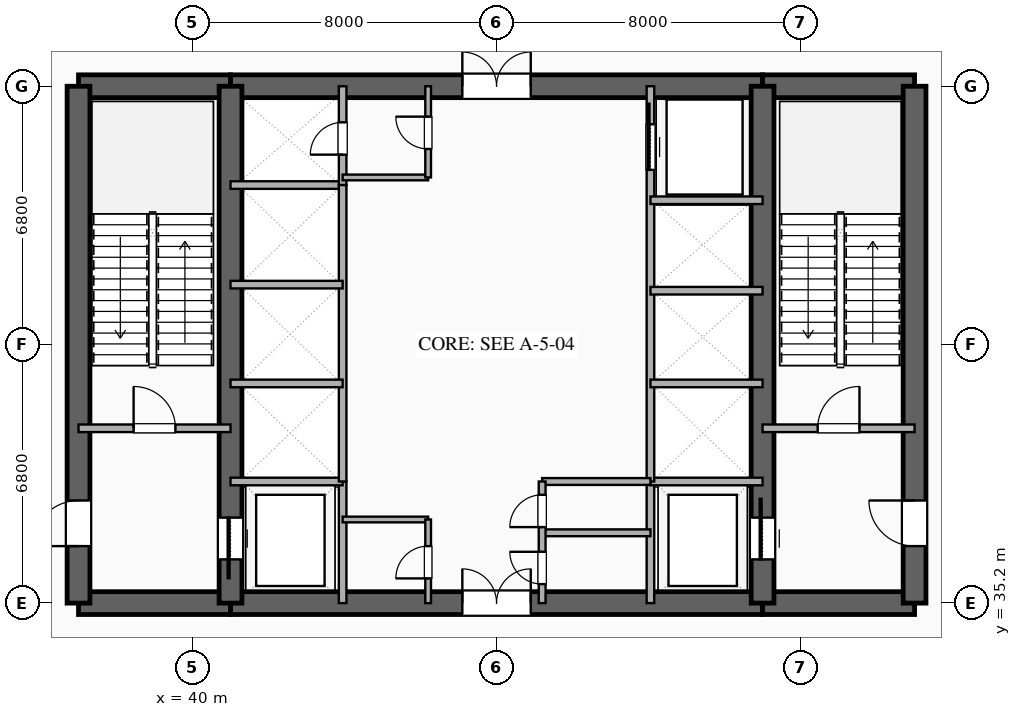
"""IFC4 building model, lengths in metres.
Left out: names, types, materials, properties, quantities, classifications, styles, units other than length and angle.
Written with IfcOpenShell. Run it as: python <this file> out.ifc"""

import sys

from ifc_helpers import new_model, si_unit, direction, frame, frame_2d, origin, place, context, subcontext, project, spatial, rectangle, extrude, element, fill, save


model = new_model("IFC4")
c1 = context("Model", 3, precision=1e-05, world=origin(), true_north=direction((0.0, 1.0)))
c2 = subcontext(c1, "Body", "Model", "MODEL_VIEW")
j1 = project(units=[si_unit("LENGTHUNIT", "METRE"), si_unit("PLANEANGLEUNIT", "RADIAN")], contexts=[c1])
p1 = place(None, origin())
s1 = spatial("IfcSite", under=j1, at=p1, CompositionType="ELEMENT")
p2 = place(p1, origin())
s2 = spatial("IfcBuilding", under=s1, at=p2, CompositionType="ELEMENT")
p3 = place(p2, frame((0.0, 0.0, 6.0)))
s3 = spatial("IfcBuildingStorey", under=s2, at=p3, CompositionType="ELEMENT", Elevation=6.0)
p4 = place(p3, frame((37.0, 35.2, 0.0), z_axis=(0.0, 0.0, 1.0), x_axis=(1.0, 0.0, 0.0)))
e1 = element("IfcWall", 1, at=p4, inside=s3, PredefinedType="SHEAR", context=c2, shape_type="SweptSolid", body=[
    extrude(rectangle(XDim=4.0, YDim=0.6, at=frame_2d((2.0, 0.0))), origin(), (0.0, 0.0, 1.0), 5.12),
])
p5 = place(p3, frame((41.0, 35.2, 0.0), z_axis=(0.0, 0.0, 1.0), x_axis=(1.0, 0.0, 0.0)))
e2 = element("IfcWall", 2, at=p5, inside=s3, PredefinedType="SHEAR", context=c2, shape_type="SweptSolid", body=[
    extrude(rectangle(XDim=14.0, YDim=0.6, at=frame_2d((7.0, 0.0))), origin(), (0.0, 0.0, 1.0), 5.12),
])
p6 = place(p5, frame((6.1, 0.0, 0.0)))
e3 = element("IfcOpeningElement", 3, at=p6, cuts=e2, PredefinedType="OPENING", context=c2, shape_type="SweptSolid", body=[
    extrude(rectangle(XDim=1.8, YDim=2.25, at=frame_2d((0.9, 1.125))), frame((0.0, 0.31, 0.0), z_axis=(0.0, -1.0, 0.0), x_axis=(1.0, 0.0, 0.0)), (0.0, 0.0, 1.0), 0.62),
])
for number, where, z_axis, x_axis in (
    (4, (55.0, 35.2, 0.0), (0.0, 0.0, 1.0), (1.0, 0.0, 0.0)),
    (5, (37.0, 48.8, 0.0), (0.0, 0.0, 1.0), (1.0, 0.0, 0.0)),
):
    element("IfcWall", number, at=place(p3, frame(where, z_axis=z_axis, x_axis=x_axis)), inside=s3, PredefinedType="SHEAR", context=c2, shape_type="SweptSolid", body=[
        extrude(rectangle(XDim=4.0, YDim=0.6, at=frame_2d((2.0, 0.0))), origin(), (0.0, 0.0, 1.0), 5.12),
    ])
p7 = place(p3, frame((41.0, 48.8, 0.0), z_axis=(0.0, 0.0, 1.0), x_axis=(1.0, 0.0, 0.0)))
e6 = element("IfcWall", 6, at=p7, inside=s3, PredefinedType="SHEAR", context=c2, shape_type="SweptSolid", body=[
    extrude(rectangle(XDim=14.0, YDim=0.6, at=frame_2d((7.0, 0.0))), origin(), (0.0, 0.0, 1.0), 5.12),
])
p8 = place(p7, frame((6.1, 0.0, 0.0)))
e7 = element("IfcOpeningElement", 7, at=p8, cuts=e6, PredefinedType="OPENING", context=c2, shape_type="SweptSolid", body=[
    extrude(rectangle(XDim=1.8, YDim=2.25, at=frame_2d((0.9, 1.125))), frame((0.0, 0.31, 0.0), z_axis=(0.0, -1.0, 0.0), x_axis=(1.0, 0.0, 0.0)), (0.0, 0.0, 1.0), 0.62),
])
p9 = place(p3, frame((55.0, 48.8, 0.0), z_axis=(0.0, 0.0, 1.0), x_axis=(1.0, 0.0, 0.0)))
e8 = element("IfcWall", 8, at=p9, inside=s3, PredefinedType="SHEAR", context=c2, shape_type="SweptSolid", body=[
    extrude(rectangle(XDim=4.0, YDim=0.6, at=frame_2d((2.0, 0.0))), origin(), (0.0, 0.0, 1.0), 5.12),
])
p10 = place(p3, frame((37.0, 35.2, 0.0), z_axis=(0.0, 0.0, 1.0), x_axis=(0.0, 1.0, 0.0)))
e9 = element("IfcWall", 9, at=p10, inside=s3, PredefinedType="SHEAR", context=c2, shape_type="SweptSolid", body=[
    extrude(rectangle(XDim=13.6, YDim=0.6, at=frame_2d((6.8, 0.0))), origin(), (0.0, 0.0, 1.0), 5.12),
])
p11 = place(p10, frame((1.5, 0.0, 0.0)))
e10 = element("IfcOpeningElement", 10, at=p11, cuts=e9, PredefinedType="OPENING", context=c2, shape_type="SweptSolid", body=[
    extrude(rectangle(XDim=1.2, YDim=2.15, at=frame_2d((0.6, 1.075))), frame((0.0, 0.31, 0.0), z_axis=(0.0, -1.0, 0.0), x_axis=(1.0, 0.0, 0.0)), (0.0, 0.0, 1.0), 0.62),
])
p12 = place(p3, frame((59.0, 35.2, 0.0), z_axis=(0.0, 0.0, 1.0), x_axis=(0.0, 1.0, 0.0)))
e11 = element("IfcWall", 11, at=p12, inside=s3, PredefinedType="SHEAR", context=c2, shape_type="SweptSolid", body=[
    extrude(rectangle(XDim=13.6, YDim=0.6, at=frame_2d((6.8, 0.0))), origin(), (0.0, 0.0, 1.0), 5.12),
])
p13 = place(p12, frame((1.5, 0.0, 0.0)))
e12 = element("IfcOpeningElement", 12, at=p13, cuts=e11, PredefinedType="OPENING", context=c2, shape_type="SweptSolid", body=[
    extrude(rectangle(XDim=1.2, YDim=2.15, at=frame_2d((0.6, 1.075))), frame((0.0, 0.31, 0.0), z_axis=(0.0, -1.0, 0.0), x_axis=(1.0, 0.0, 0.0)), (0.0, 0.0, 1.0), 0.62),
])
p14 = place(p3, frame((41.0, 35.2, 0.0), z_axis=(0.0, 0.0, 1.0), x_axis=(0.0, 1.0, 0.0)))
e13 = element("IfcWall", 13, at=p14, inside=s3, PredefinedType="SHEAR", context=c2, shape_type="SweptSolid", body=[
    extrude(rectangle(XDim=13.6, YDim=0.6, at=frame_2d((6.8, 0.0))), origin(), (0.0, 0.0, 1.0), 5.12),
])
p15 = place(p14, frame((1.15, 0.0, 0.0)))
e14 = element("IfcOpeningElement", 14, at=p15, cuts=e13, PredefinedType="OPENING", context=c2, shape_type="SweptSolid", body=[
    extrude(rectangle(XDim=1.1, YDim=2.2, at=frame_2d((0.55, 1.1))), frame((0.0, 0.31, 0.0), z_axis=(0.0, -1.0, 0.0), x_axis=(1.0, 0.0, 0.0)), (0.0, 0.0, 1.0), 0.62),
])
p16 = place(p3, frame((55.0, 35.2, 0.0), z_axis=(0.0, 0.0, 1.0), x_axis=(0.0, 1.0, 0.0)))
e15 = element("IfcWall", 15, at=p16, inside=s3, PredefinedType="SHEAR", context=c2, shape_type="SweptSolid", body=[
    extrude(rectangle(XDim=13.6, YDim=0.6, at=frame_2d((6.8, 0.0))), origin(), (0.0, 0.0, 1.0), 5.12),
])
p17 = place(p16, frame((1.15, 0.0, 0.0)))
e16 = element("IfcOpeningElement", 16, at=p17, cuts=e15, PredefinedType="OPENING", context=c2, shape_type="SweptSolid", body=[
    extrude(rectangle(XDim=1.1, YDim=2.2, at=frame_2d((0.55, 1.1))), frame((0.0, 0.31, 0.0), z_axis=(0.0, -1.0, 0.0), x_axis=(1.0, 0.0, 0.0)), (0.0, 0.0, 1.0), 0.62),
])
p18 = place(p3, frame((37.0, 39.8, 0.0), z_axis=(0.0, 0.0, 1.0), x_axis=(1.0, 0.0, 0.0)))
e17 = element("IfcWall", 17, at=p18, inside=s3, PredefinedType="SOLIDWALL", context=c2, shape_type="SweptSolid", body=[
    extrude(rectangle(XDim=4.0, YDim=0.2, at=frame_2d((2.0, 0.0))), origin(), (0.0, 0.0, 1.0), 4.32),
])
p19 = place(p18, frame((1.45, 0.0, 0.0)))
e18 = element("IfcOpeningElement", 18, at=p19, cuts=e17, PredefinedType="OPENING", context=c2, shape_type="SweptSolid", body=[
    extrude(rectangle(XDim=1.1, YDim=2.15, at=frame_2d((0.55, 1.075))), frame((0.0, 0.11, 0.0), z_axis=(0.0, -1.0, 0.0), x_axis=(1.0, 0.0, 0.0)), (0.0, 0.0, 1.0), 0.22),
])
p20 = place(p3, frame((55.0, 39.8, 0.0), z_axis=(0.0, 0.0, 1.0), x_axis=(1.0, 0.0, 0.0)))
e19 = element("IfcWall", 19, at=p20, inside=s3, PredefinedType="SOLIDWALL", context=c2, shape_type="SweptSolid", body=[
    extrude(rectangle(XDim=4.0, YDim=0.2, at=frame_2d((2.0, 0.0))), origin(), (0.0, 0.0, 1.0), 4.32),
])
p21 = place(p20, frame((1.45, 0.0, 0.0)))
e20 = element("IfcOpeningElement", 20, at=p21, cuts=e19, PredefinedType="OPENING", context=c2, shape_type="SweptSolid", body=[
    extrude(rectangle(XDim=1.1, YDim=2.15, at=frame_2d((0.55, 1.075))), frame((0.0, 0.11, 0.0), z_axis=(0.0, -1.0, 0.0), x_axis=(1.0, 0.0, 0.0)), (0.0, 0.0, 1.0), 0.22),
])
p22 = place(p3, frame((43.95, 35.2, 0.0), z_axis=(0.0, 0.0, 1.0), x_axis=(0.0, 1.0, 0.0)))
e21 = element("IfcWall", 21, at=p22, inside=s3, PredefinedType="SOLIDWALL", context=c2, shape_type="SweptSolid", body=[
    extrude(rectangle(XDim=3.2, YDim=0.2, at=frame_2d((1.6, 0.0))), origin(), (0.0, 0.0, 1.0), 4.32),
])
p23 = place(p3, frame((41.0, 38.4, 0.0), z_axis=(0.0, 0.0, 1.0), x_axis=(1.0, 0.0, 0.0)))
e22 = element("IfcWall", 22, at=p23, inside=s3, PredefinedType="SOLIDWALL", context=c2, shape_type="SweptSolid", body=[
    extrude(rectangle(XDim=2.95, YDim=0.2, at=frame_2d((1.475, 0.0))), origin(), (0.0, 0.0, 1.0), 4.32),
])
p24 = place(p3, frame((52.05, 35.2, 0.0), z_axis=(0.0, 0.0, 1.0), x_axis=(0.0, 1.0, 0.0)))
e23 = element("IfcWall", 23, at=p24, inside=s3, PredefinedType="SOLIDWALL", context=c2, shape_type="SweptSolid", body=[
    extrude(rectangle(XDim=3.2, YDim=0.2, at=frame_2d((1.6, 0.0))), origin(), (0.0, 0.0, 1.0), 4.32),
])
for number, where, z_axis, x_axis in (
    (24, (52.05, 38.4, 0.0), (0.0, 0.0, 1.0), (1.0, 0.0, 0.0)),
    (25, (41.0, 46.2, 0.0), (0.0, 0.0, 1.0), (1.0, 0.0, 0.0)),
):
    element("IfcWall", number, at=place(p3, frame(where, z_axis=z_axis, x_axis=x_axis)), inside=s3, PredefinedType="SOLIDWALL", context=c2, shape_type="SweptSolid", body=[
        extrude(rectangle(XDim=2.95, YDim=0.2, at=frame_2d((1.475, 0.0))), origin(), (0.0, 0.0, 1.0), 4.32),
    ])
p25 = place(p3, frame((43.95, 46.2, 0.0), z_axis=(0.0, 0.0, 1.0), x_axis=(0.0, 1.0, 0.0)))
e26 = element("IfcWall", 26, at=p25, inside=s3, PredefinedType="SOLIDWALL", context=c2, shape_type="SweptSolid", body=[
    extrude(rectangle(XDim=2.6, YDim=0.2, at=frame_2d((1.3, 0.0))), origin(), (0.0, 0.0, 1.0), 4.32),
])
p26 = place(p25, frame((0.8, 0.0, 0.0)))
e27 = element("IfcOpeningElement", 27, at=p26, cuts=e26, PredefinedType="OPENING", context=c2, shape_type="SweptSolid", body=[
    extrude(rectangle(XDim=0.85, YDim=2.15, at=frame_2d((0.425, 1.075))), frame((0.0, 0.11, 0.0), z_axis=(0.0, -1.0, 0.0), x_axis=(1.0, 0.0, 0.0)), (0.0, 0.0, 1.0), 0.22),
])
p27 = place(p3, frame((43.95, 38.4, 0.0), z_axis=(0.0, 0.0, 1.0), x_axis=(0.0, 1.0, 0.0)))
e28 = element("IfcWall", 28, at=p27, inside=s3, PredefinedType="SOLIDWALL", context=c2, shape_type="SweptSolid", body=[
    extrude(rectangle(XDim=7.8, YDim=0.2, at=frame_2d((3.9, 0.0))), origin(), (0.0, 0.0, 1.0), 4.32),
])
for number, where, z_axis, x_axis in (
    (29, (41.0, 40.98, 0.0), (0.0, 0.0, 1.0), (1.0, 0.0, 0.0)),
    (30, (41.0, 43.58, 0.0), (0.0, 0.0, 1.0), (1.0, 0.0, 0.0)),
):
    element("IfcWall", number, at=place(p3, frame(where, z_axis=z_axis, x_axis=x_axis)), inside=s3, PredefinedType="SOLIDWALL", context=c2, shape_type="SweptSolid", body=[
        extrude(rectangle(XDim=2.95, YDim=0.2, at=frame_2d((1.475, 0.0))), origin(), (0.0, 0.0, 1.0), 4.32),
    ])
p28 = place(p3, frame((52.05, 38.4, 0.0), z_axis=(0.0, 0.0, 1.0), x_axis=(0.0, 1.0, 0.0)))
e31 = element("IfcWall", 31, at=p28, inside=s3, PredefinedType="SOLIDWALL", context=c2, shape_type="SweptSolid", body=[
    extrude(rectangle(XDim=10.4, YDim=0.2, at=frame_2d((5.2, 0.0))), origin(), (0.0, 0.0, 1.0), 4.32),
])
p29 = place(p28, frame((8.2, 0.0, 0.0)))
e32 = element("IfcOpeningElement", 32, at=p29, cuts=e31, PredefinedType="OPENING", context=c2, shape_type="SweptSolid", body=[
    extrude(rectangle(XDim=1.2, YDim=2.2, at=frame_2d((0.6, 1.1))), frame((0.0, 0.11, 0.0), z_axis=(0.0, -1.0, 0.0), x_axis=(1.0, 0.0, 0.0)), (0.0, 0.0, 1.0), 0.22),
])
for number, where, z_axis, x_axis in (
    (33, (52.05, 40.98, 0.0), (0.0, 0.0, 1.0), (1.0, 0.0, 0.0)),
    (34, (52.05, 43.42, 0.0), (0.0, 0.0, 1.0), (1.0, 0.0, 0.0)),
    (35, (52.05, 45.8, 0.0), (0.0, 0.0, 1.0), (1.0, 0.0, 0.0)),
):
    element("IfcWall", number, at=place(p3, frame(where, z_axis=z_axis, x_axis=x_axis)), inside=s3, PredefinedType="SOLIDWALL", context=c2, shape_type="SweptSolid", body=[
        extrude(rectangle(XDim=2.95, YDim=0.2, at=frame_2d((1.475, 0.0))), origin(), (0.0, 0.0, 1.0), 4.32),
    ])
p30 = place(p3, frame((43.95, 37.4, 0.0), z_axis=(0.0, 0.0, 1.0), x_axis=(1.0, 0.0, 0.0)))
e36 = element("IfcWall", 36, at=p30, inside=s3, PredefinedType="PARTITIONING", context=c2, shape_type="SweptSolid", body=[
    extrude(rectangle(XDim=2.25, YDim=0.15, at=frame_2d((1.125, 0.0))), origin(), (0.0, 0.0, 1.0), 4.32),
])
p31 = place(p3, frame((46.2, 35.2, 0.0), z_axis=(0.0, 0.0, 1.0), x_axis=(0.0, 1.0, 0.0)))
e37 = element("IfcWall", 37, at=p31, inside=s3, PredefinedType="PARTITIONING", context=c2, shape_type="SweptSolid", body=[
    extrude(rectangle(XDim=2.2, YDim=0.15, at=frame_2d((1.1, 0.0))), origin(), (0.0, 0.0, 1.0), 4.32),
])
p32 = place(p31, frame((0.65, 0.0, 0.0)))
e38 = element("IfcOpeningElement", 38, at=p32, cuts=e37, PredefinedType="OPENING", context=c2, shape_type="SweptSolid", body=[
    extrude(rectangle(XDim=0.85, YDim=2.15, at=frame_2d((0.425, 1.075))), frame((0.0, 0.085, 0.0), z_axis=(0.0, -1.0, 0.0), x_axis=(1.0, 0.0, 0.0)), (0.0, 0.0, 1.0), 0.17),
])
p33 = place(p3, frame((43.95, 46.4, 0.0), z_axis=(0.0, 0.0, 1.0), x_axis=(1.0, 0.0, 0.0)))
e39 = element("IfcWall", 39, at=p33, inside=s3, PredefinedType="PARTITIONING", context=c2, shape_type="SweptSolid", body=[
    extrude(rectangle(XDim=2.25, YDim=0.15, at=frame_2d((1.125, 0.0))), origin(), (0.0, 0.0, 1.0), 4.32),
])
p34 = place(p3, frame((46.2, 46.4, 0.0), z_axis=(0.0, 0.0, 1.0), x_axis=(0.0, 1.0, 0.0)))
e40 = element("IfcWall", 40, at=p34, inside=s3, PredefinedType="PARTITIONING", context=c2, shape_type="SweptSolid", body=[
    extrude(rectangle(XDim=2.4, YDim=0.15, at=frame_2d((1.2, 0.0))), origin(), (0.0, 0.0, 1.0), 4.32),
])
p35 = place(p34, frame((0.75, 0.0, 0.0)))
e41 = element("IfcOpeningElement", 41, at=p35, cuts=e40, PredefinedType="OPENING", context=c2, shape_type="SweptSolid", body=[
    extrude(rectangle(XDim=0.85, YDim=2.15, at=frame_2d((0.425, 1.075))), frame((0.0, 0.085, 0.0), z_axis=(0.0, -1.0, 0.0), x_axis=(1.0, 0.0, 0.0)), (0.0, 0.0, 1.0), 0.17),
])
for number, where, z_axis, x_axis in (
    (42, (49.2, 37.05, 0.0), (0.0, 0.0, 1.0), (1.0, 0.0, 0.0)),
    (43, (49.2, 38.4, 0.0), (0.0, 0.0, 1.0), (1.0, 0.0, 0.0)),
):
    element("IfcWall", number, at=place(p3, frame(where, z_axis=z_axis, x_axis=x_axis)), inside=s3, PredefinedType="PLUMBINGWALL", context=c2, shape_type="SweptSolid", body=[
        extrude(rectangle(XDim=2.85, YDim=0.18, at=frame_2d((1.425, 0.0))), origin(), (0.0, 0.0, 1.0), 4.32),
    ])
p36 = place(p3, frame((49.2, 35.2, 0.0), z_axis=(0.0, 0.0, 1.0), x_axis=(0.0, 1.0, 0.0)))
e44 = element("IfcWall", 44, at=p36, inside=s3, PredefinedType="PLUMBINGWALL", context=c2, shape_type="SweptSolid", body=[
    extrude(rectangle(XDim=3.2, YDim=0.18, at=frame_2d((1.6, 0.0))), origin(), (0.0, 0.0, 1.0), 4.32),
])
p37 = place(p36, frame((0.5, 0.0, 0.0)))
e45 = element("IfcOpeningElement", 45, at=p37, cuts=e44, PredefinedType="OPENING", context=c2, shape_type="SweptSolid", body=[
    extrude(rectangle(XDim=0.85, YDim=2.1, at=frame_2d((0.425, 1.05))), frame((0.0, 0.1, 0.0), z_axis=(0.0, -1.0, 0.0), x_axis=(1.0, 0.0, 0.0)), (0.0, 0.0, 1.0), 0.2),
])
p38 = place(p36, frame((2.0, 0.0, 0.0)))
e46 = element("IfcOpeningElement", 46, at=p38, cuts=e44, PredefinedType="OPENING", context=c2, shape_type="SweptSolid", body=[
    extrude(rectangle(XDim=0.85, YDim=2.15, at=frame_2d((0.425, 1.075))), frame((0.0, 0.1, 0.0), z_axis=(0.0, -1.0, 0.0), x_axis=(1.0, 0.0, 0.0)), (0.0, 0.0, 1.0), 0.2),
])
p39 = place(p15, origin())
e47 = element("IfcDoor", 47, at=p39, inside=s3, OperationType="SLIDING_TO_LEFT", PredefinedType="DOOR", context=c2, shape_type="SweptSolid", body=[
    extrude(rectangle(XDim=1.1, YDim=2.2, at=frame_2d((0.55, 1.1))), frame((0.0, 0.025, 0.0), z_axis=(0.0, -1.0, 0.0), x_axis=(1.0, 0.0, 0.0)), (0.0, 0.0, 1.0), 0.05),
])
fill(e14, e47)
p40 = place(p17, origin())
e48 = element("IfcDoor", 48, at=p40, inside=s3, OperationType="SLIDING_TO_RIGHT", PredefinedType="DOOR", context=c2, shape_type="SweptSolid", body=[
    extrude(rectangle(XDim=1.1, YDim=2.2, at=frame_2d((0.55, 1.1))), frame((0.0, 0.025, 0.0), z_axis=(0.0, -1.0, 0.0), x_axis=(1.0, 0.0, 0.0)), (0.0, 0.0, 1.0), 0.05),
])
fill(e16, e48)
p41 = place(p11, origin())
e49 = element("IfcDoor", 49, at=p41, inside=s3, OperationType="SINGLE_SWING_LEFT", PredefinedType="DOOR", context=c2, shape_type="SweptSolid", body=[
    extrude(rectangle(XDim=1.2, YDim=2.15, at=frame_2d((0.6, 1.075))), frame((0.0, 0.025, 0.0), z_axis=(0.0, -1.0, 0.0), x_axis=(1.0, 0.0, 0.0)), (0.0, 0.0, 1.0), 0.05),
])
fill(e10, e49)
p42 = place(p13, origin())
e50 = element("IfcDoor", 50, at=p42, inside=s3, OperationType="SINGLE_SWING_RIGHT", PredefinedType="DOOR", context=c2, shape_type="SweptSolid", body=[
    extrude(rectangle(XDim=1.2, YDim=2.15, at=frame_2d((0.6, 1.075))), frame((0.0, 0.025, 0.0), z_axis=(0.0, -1.0, 0.0), x_axis=(1.0, 0.0, 0.0)), (0.0, 0.0, 1.0), 0.05),
])
fill(e12, e50)
p43 = place(p6, origin())
e51 = element("IfcDoor", 51, at=p43, inside=s3, OperationType="DOUBLE_DOOR_SINGLE_SWING", PredefinedType="DOOR", context=c2, shape_type="SweptSolid", body=[
    extrude(rectangle(XDim=1.8, YDim=2.25, at=frame_2d((0.9, 1.125))), frame((0.0, 0.025, 0.0), z_axis=(0.0, -1.0, 0.0), x_axis=(1.0, 0.0, 0.0)), (0.0, 0.0, 1.0), 0.05),
])
fill(e3, e51)
p44 = place(p8, origin())
e52 = element("IfcDoor", 52, at=p44, inside=s3, OperationType="DOUBLE_DOOR_SINGLE_SWING", PredefinedType="DOOR", context=c2, shape_type="SweptSolid", body=[
    extrude(rectangle(XDim=1.8, YDim=2.25, at=frame_2d((0.9, 1.125))), frame((0.0, 0.025, 0.0), z_axis=(0.0, -1.0, 0.0), x_axis=(1.0, 0.0, 0.0)), (0.0, 0.0, 1.0), 0.05),
])
fill(e7, e52)
p45 = place(p19, origin())
e53 = element("IfcDoor", 53, at=p45, inside=s3, OperationType="SINGLE_SWING_LEFT", PredefinedType="DOOR", context=c2, shape_type="SweptSolid", body=[
    extrude(rectangle(XDim=1.1, YDim=2.15, at=frame_2d((0.55, 1.075))), frame((0.0, 0.025, 0.0), z_axis=(0.0, -1.0, 0.0), x_axis=(1.0, 0.0, 0.0)), (0.0, 0.0, 1.0), 0.05),
])
fill(e18, e53)
p46 = place(p21, origin())
e54 = element("IfcDoor", 54, at=p46, inside=s3, OperationType="SINGLE_SWING_RIGHT", PredefinedType="DOOR", context=c2, shape_type="SweptSolid", body=[
    extrude(rectangle(XDim=1.1, YDim=2.15, at=frame_2d((0.55, 1.075))), frame((0.0, 0.025, 0.0), z_axis=(0.0, -1.0, 0.0), x_axis=(1.0, 0.0, 0.0)), (0.0, 0.0, 1.0), 0.05),
])
fill(e20, e54)
p47 = place(p26, origin())
e55 = element("IfcDoor", 55, at=p47, inside=s3, OperationType="SINGLE_SWING_LEFT", PredefinedType="DOOR", context=c2, shape_type="SweptSolid", body=[
    extrude(rectangle(XDim=0.85, YDim=2.15, at=frame_2d((0.425, 1.075))), frame((0.0, 0.025, 0.0), z_axis=(0.0, -1.0, 0.0), x_axis=(1.0, 0.0, 0.0)), (0.0, 0.0, 1.0), 0.05),
])
fill(e27, e55)
p48 = place(p29, origin())
e56 = element("IfcDoor", 56, at=p48, inside=s3, OperationType="SLIDING_TO_RIGHT", PredefinedType="DOOR", context=c2, shape_type="SweptSolid", body=[
    extrude(rectangle(XDim=1.2, YDim=2.2, at=frame_2d((0.6, 1.1))), frame((0.0, 0.025, 0.0), z_axis=(0.0, -1.0, 0.0), x_axis=(1.0, 0.0, 0.0)), (0.0, 0.0, 1.0), 0.05),
])
fill(e32, e56)
p49 = place(p32, origin())
e57 = element("IfcDoor", 57, at=p49, inside=s3, OperationType="SINGLE_SWING_LEFT", PredefinedType="DOOR", context=c2, shape_type="SweptSolid", body=[
    extrude(rectangle(XDim=0.85, YDim=2.15, at=frame_2d((0.425, 1.075))), frame((0.0, 0.025, 0.0), z_axis=(0.0, -1.0, 0.0), x_axis=(1.0, 0.0, 0.0)), (0.0, 0.0, 1.0), 0.05),
])
fill(e38, e57)
p50 = place(p35, origin())
e58 = element("IfcDoor", 58, at=p50, inside=s3, OperationType="SINGLE_SWING_RIGHT", PredefinedType="DOOR", context=c2, shape_type="SweptSolid", body=[
    extrude(rectangle(XDim=0.85, YDim=2.15, at=frame_2d((0.425, 1.075))), frame((0.0, 0.025, 0.0), z_axis=(0.0, -1.0, 0.0), x_axis=(1.0, 0.0, 0.0)), (0.0, 0.0, 1.0), 0.05),
])
fill(e41, e58)
p51 = place(p37, origin())
e59 = element("IfcDoor", 59, at=p51, inside=s3, OperationType="SINGLE_SWING_RIGHT", PredefinedType="DOOR", context=c2, shape_type="SweptSolid", body=[
    extrude(rectangle(XDim=0.85, YDim=2.1, at=frame_2d((0.425, 1.05))), frame((0.0, 0.025, 0.0), z_axis=(0.0, -1.0, 0.0), x_axis=(1.0, 0.0, 0.0)), (0.0, 0.0, 1.0), 0.05),
])
fill(e45, e59)
p52 = place(p38, origin())
e60 = element("IfcDoor", 60, at=p52, inside=s3, OperationType="SINGLE_SWING_LEFT", PredefinedType="DOOR", context=c2, shape_type="SweptSolid", body=[
    extrude(rectangle(XDim=0.85, YDim=2.15, at=frame_2d((0.425, 1.075))), frame((0.0, 0.025, 0.0), z_axis=(0.0, -1.0, 0.0), x_axis=(1.0, 0.0, 0.0)), (0.0, 0.0, 1.0), 0.05),
])
fill(e46, e60)
save(model, sys.argv[1])
